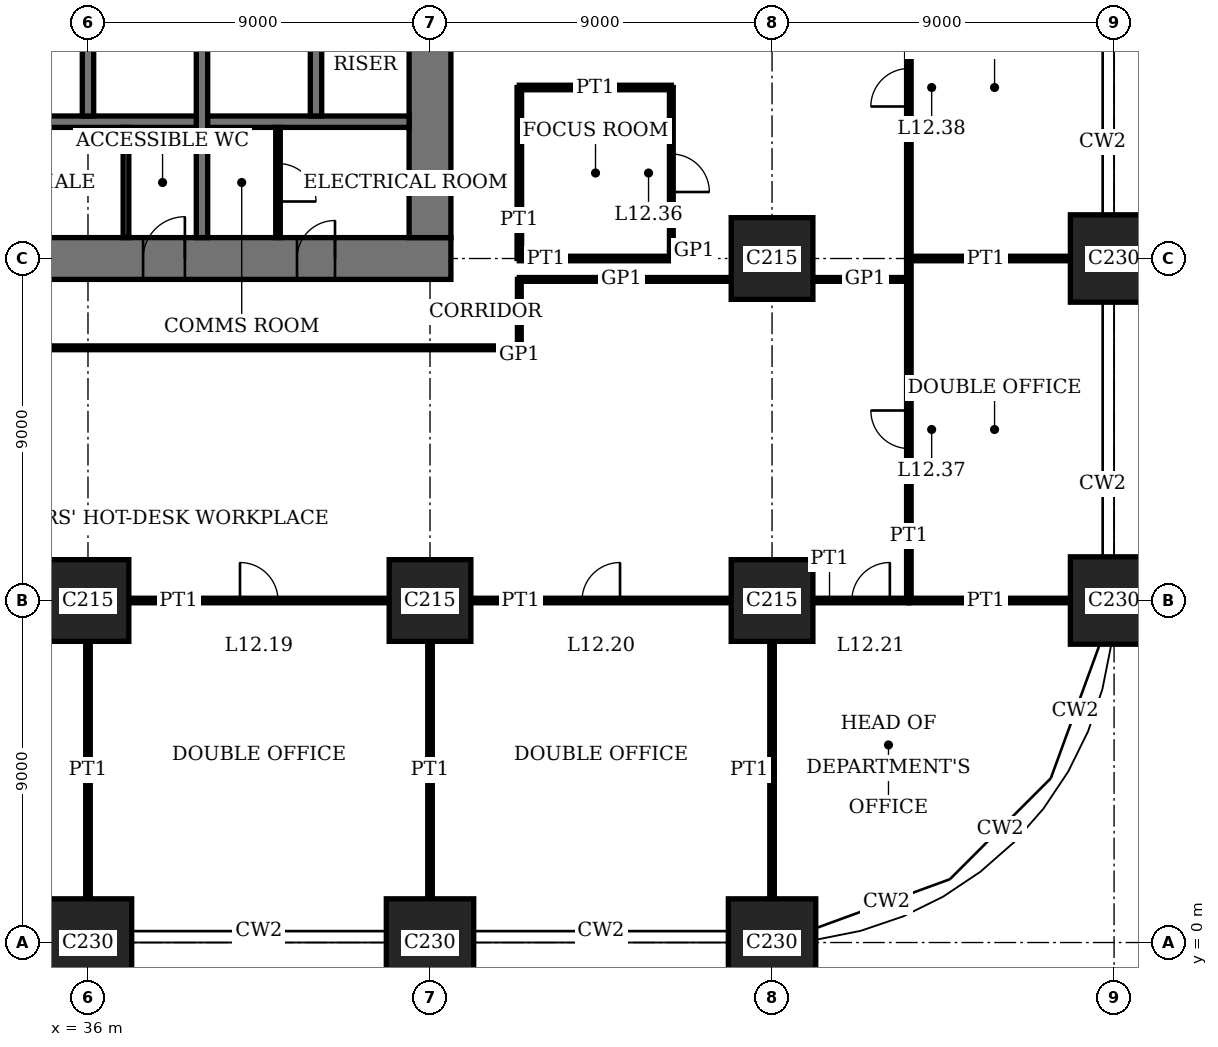
"""IFC4 building model, lengths in metres.
Left out: names, types, materials, properties, quantities, classifications, styles, units other than length and angle.
Written with IfcOpenShell. Run it as: python <this file> out.ifc"""

import sys

from ifc_helpers import new_model, si_unit, direction, frame, frame_2d, origin, origin_2d, place, context, subcontext, project, spatial, rectangle, extrude, element, fill, save


model = new_model("IFC4")
c1 = context("Model", 3, precision=1e-05, world=origin(), true_north=direction((0.0, 1.0)))
c2 = subcontext(c1, "Body", "Model", "MODEL_VIEW")
j1 = project(units=[si_unit("LENGTHUNIT", "METRE"), si_unit("PLANEANGLEUNIT", "RADIAN")], contexts=[c1])
p1 = place(None, origin())
s1 = spatial("IfcSite", under=j1, at=p1, CompositionType="ELEMENT")
p2 = place(p1, origin())
s2 = spatial("IfcBuilding", under=s1, at=p2, CompositionType="ELEMENT")
p3 = place(p2, frame((0.0, 0.0, 51.8)))
s3 = spatial("IfcBuildingStorey", under=s2, at=p3, CompositionType="ELEMENT", Elevation=51.8)
p4 = place(p3, frame((36.0, 0.0, 0.0), z_axis=(0.0, 0.0, 1.0), x_axis=(1.0, 0.0, 0.0)))
e1 = element("IfcColumn", 1, at=p4, inside=s3, PredefinedType="COLUMN", context=c2, shape_type="SweptSolid", body=[
    extrude(rectangle(XDim=2.3, YDim=2.3, at=origin_2d()), origin(), (0.0, 0.0, 1.0), 4.0),
])
p5 = place(p3, frame((36.0, 9.0, 0.0), z_axis=(0.0, 0.0, 1.0), x_axis=(1.0, 0.0, 0.0)))
e2 = element("IfcColumn", 2, at=p5, inside=s3, PredefinedType="COLUMN", context=c2, shape_type="SweptSolid", body=[
    extrude(rectangle(XDim=2.15, YDim=2.15, at=origin_2d()), origin(), (0.0, 0.0, 1.0), 4.0),
])
p6 = place(p3, frame((45.0, 0.0, 0.0), z_axis=(0.0, 0.0, 1.0), x_axis=(1.0, 0.0, 0.0)))
e3 = element("IfcColumn", 3, at=p6, inside=s3, PredefinedType="COLUMN", context=c2, shape_type="SweptSolid", body=[
    extrude(rectangle(XDim=2.3, YDim=2.3, at=origin_2d()), origin(), (0.0, 0.0, 1.0), 4.0),
])
p7 = place(p3, frame((45.0, 9.0, 0.0), z_axis=(0.0, 0.0, 1.0), x_axis=(1.0, 0.0, 0.0)))
e4 = element("IfcColumn", 4, at=p7, inside=s3, PredefinedType="COLUMN", context=c2, shape_type="SweptSolid", body=[
    extrude(rectangle(XDim=2.15, YDim=2.15, at=origin_2d()), origin(), (0.0, 0.0, 1.0), 4.0),
])
p8 = place(p3, frame((54.0, 0.0, 0.0), z_axis=(0.0, 0.0, 1.0), x_axis=(1.0, 0.0, 0.0)))
e5 = element("IfcColumn", 5, at=p8, inside=s3, PredefinedType="COLUMN", context=c2, shape_type="SweptSolid", body=[
    extrude(rectangle(XDim=2.3, YDim=2.3, at=origin_2d()), origin(), (0.0, 0.0, 1.0), 4.0),
])
for number, where, z_axis, x_axis in (
    (6, (54.0, 9.0, 0.0), (0.0, 0.0, 1.0), (1.0, 0.0, 0.0)),
    (7, (54.0, 18.0, 0.0), (0.0, 0.0, 1.0), (1.0, 0.0, 0.0)),
):
    element("IfcColumn", number, at=place(p3, frame(where, z_axis=z_axis, x_axis=x_axis)), inside=s3, PredefinedType="COLUMN", context=c2, shape_type="SweptSolid", body=[
        extrude(rectangle(XDim=2.15, YDim=2.15, at=origin_2d()), origin(), (0.0, 0.0, 1.0), 4.0),
    ])
for number, where, z_axis, x_axis in (
    (8, (63.0, 9.0, 0.0), (0.0, 0.0, 1.0), (1.0, 0.0, 0.0)),
    (9, (63.0, 18.0, 0.0), (0.0, 0.0, 1.0), (1.0, 0.0, 0.0)),
):
    element("IfcColumn", number, at=place(p3, frame(where, z_axis=z_axis, x_axis=x_axis)), inside=s3, PredefinedType="COLUMN", context=c2, shape_type="SweptSolid", body=[
        extrude(rectangle(XDim=2.3, YDim=2.3, at=origin_2d()), origin(), (0.0, 0.0, 1.0), 4.0),
    ])
p9 = place(p3, frame((17.45, 18.0, 0.0), z_axis=(0.0, 0.0, 1.0), x_axis=(1.0, 0.0, 0.0)))
e10 = element("IfcWall", 10, at=p9, inside=s3, PredefinedType="SHEAR", context=c2, shape_type="SweptSolid", body=[
    extrude(rectangle(XDim=28.1, YDim=1.1, at=frame_2d((14.05, 0.0))), origin(), (0.0, 0.0, 1.0), 4.0),
])
p10 = place(p9, frame((11.55, 0.0, 0.0)))
e11 = element("IfcOpeningElement", 11, at=p10, cuts=e10, PredefinedType="OPENING", context=c2, shape_type="SweptSolid", body=[
    extrude(rectangle(XDim=1.0, YDim=2.4, at=frame_2d((0.5, 1.2))), frame((0.0, 0.56, 0.0), z_axis=(0.0, -1.0, 0.0), x_axis=(1.0, 0.0, 0.0)), (0.0, 0.0, 1.0), 1.12),
])
p11 = place(p9, frame((16.55, 0.0, 0.0)))
e12 = element("IfcOpeningElement", 12, at=p11, cuts=e10, PredefinedType="OPENING", context=c2, shape_type="SweptSolid", body=[
    extrude(rectangle(XDim=1.0, YDim=2.4, at=frame_2d((0.5, 1.2))), frame((0.0, 0.56, 0.0), z_axis=(0.0, -1.0, 0.0), x_axis=(1.0, 0.0, 0.0)), (0.0, 0.0, 1.0), 1.12),
])
p12 = place(p9, frame((20.0, 0.0, 0.0)))
e13 = element("IfcOpeningElement", 13, at=p12, cuts=e10, PredefinedType="OPENING", context=c2, shape_type="SweptSolid", body=[
    extrude(rectangle(XDim=1.1, YDim=2.4, at=frame_2d((0.55, 1.2))), frame((0.0, 0.56, 0.0), z_axis=(0.0, -1.0, 0.0), x_axis=(1.0, 0.0, 0.0)), (0.0, 0.0, 1.0), 1.12),
])
p13 = place(p9, frame((24.05, 0.0, 0.0)))
e14 = element("IfcOpeningElement", 14, at=p13, cuts=e10, PredefinedType="OPENING", context=c2, shape_type="SweptSolid", body=[
    extrude(rectangle(XDim=1.0, YDim=2.4, at=frame_2d((0.5, 1.2))), frame((0.0, 0.56, 0.0), z_axis=(0.0, -1.0, 0.0), x_axis=(1.0, 0.0, 0.0)), (0.0, 0.0, 1.0), 1.12),
])
p14 = place(p3, frame((45.0, 18.55, 0.0), z_axis=(0.0, 0.0, 1.0), x_axis=(0.0, 1.0, 0.0)))
e15 = element("IfcWall", 15, at=p14, inside=s3, PredefinedType="SHEAR", context=c2, shape_type="SweptSolid", body=[
    extrude(rectangle(XDim=16.9, YDim=1.1, at=frame_2d((8.45, 0.0))), origin(), (0.0, 0.0, 1.0), 4.0),
])
p15 = place(p14, frame((8.45, 0.0, 0.0)))
e16 = element("IfcOpeningElement", 16, at=p15, cuts=e15, PredefinedType="OPENING", context=c2, shape_type="SweptSolid", body=[
    extrude(rectangle(XDim=1.8, YDim=2.4, at=frame_2d((0.9, 1.2))), frame((0.0, 0.56, 0.0), z_axis=(0.0, -1.0, 0.0), x_axis=(1.0, 0.0, 0.0)), (0.0, 0.0, 1.0), 1.12),
])
p16 = place(p3, frame((27.15, 21.6, 0.0), z_axis=(0.0, 0.0, 1.0), x_axis=(1.0, 0.0, 0.0)))
e17 = element("IfcWall", 17, at=p16, inside=s3, PredefinedType="SHEAR", context=c2, shape_type="SweptSolid", body=[
    extrude(rectangle(XDim=17.3, YDim=0.3, at=frame_2d((8.65, 0.0))), origin(), (0.0, 0.0, 1.0), 4.0),
])
p17 = place(p3, frame((36.0, 21.75, 0.0), z_axis=(0.0, 0.0, 1.0), x_axis=(0.0, 1.0, 0.0)))
e18 = element("IfcWall", 18, at=p17, inside=s3, PredefinedType="SHEAR", context=c2, shape_type="SweptSolid", body=[
    extrude(rectangle(XDim=2.7, YDim=0.3, at=frame_2d((1.35, 0.0))), origin(), (0.0, 0.0, 1.0), 4.0),
])
p18 = place(p3, frame((39.0, 18.55, 0.0), z_axis=(0.0, 0.0, 1.0), x_axis=(0.0, 1.0, 0.0)))
e19 = element("IfcWall", 19, at=p18, inside=s3, PredefinedType="SHEAR", context=c2, shape_type="SweptSolid", body=[
    extrude(rectangle(XDim=5.9, YDim=0.3, at=frame_2d((2.95, 0.0))), origin(), (0.0, 0.0, 1.0), 4.0),
])
p19 = place(p3, frame((42.0, 21.75, 0.0), z_axis=(0.0, 0.0, 1.0), x_axis=(0.0, 1.0, 0.0)))
e20 = element("IfcWall", 20, at=p19, inside=s3, PredefinedType="SHEAR", context=c2, shape_type="SweptSolid", body=[
    extrude(rectangle(XDim=2.7, YDim=0.3, at=frame_2d((1.35, 0.0))), origin(), (0.0, 0.0, 1.0), 4.0),
])
p20 = place(p3, frame((37.075, 9.0, 0.0), z_axis=(0.0, 0.0, 1.0), x_axis=(1.0, 0.0, 0.0)))
e21 = element("IfcWall", 21, at=p20, inside=s3, PredefinedType="PARTITIONING", context=c2, shape_type="SweptSolid", body=[
    extrude(rectangle(XDim=6.85, YDim=0.12, at=frame_2d((3.425, 0.0))), origin(), (0.0, 0.0, 1.0), 3.05),
])
p21 = place(p20, frame((2.925, 0.0, 0.0)))
e22 = element("IfcOpeningElement", 22, at=p21, cuts=e21, PredefinedType="OPENING", context=c2, shape_type="SweptSolid", body=[
    extrude(rectangle(XDim=1.0, YDim=2.4, at=frame_2d((0.5, 1.2))), frame((0.0, 0.07, 0.0), z_axis=(0.0, -1.0, 0.0), x_axis=(1.0, 0.0, 0.0)), (0.0, 0.0, 1.0), 0.14),
])
p22 = place(p3, frame((46.075, 9.0, 0.0), z_axis=(0.0, 0.0, 1.0), x_axis=(1.0, 0.0, 0.0)))
e23 = element("IfcWall", 23, at=p22, inside=s3, PredefinedType="PARTITIONING", context=c2, shape_type="SweptSolid", body=[
    extrude(rectangle(XDim=6.85, YDim=0.12, at=frame_2d((3.425, 0.0))), origin(), (0.0, 0.0, 1.0), 3.05),
])
p23 = place(p22, frame((2.925, 0.0, 0.0)))
e24 = element("IfcOpeningElement", 24, at=p23, cuts=e23, PredefinedType="OPENING", context=c2, shape_type="SweptSolid", body=[
    extrude(rectangle(XDim=1.0, YDim=2.4, at=frame_2d((0.5, 1.2))), frame((0.0, 0.07, 0.0), z_axis=(0.0, -1.0, 0.0), x_axis=(1.0, 0.0, 0.0)), (0.0, 0.0, 1.0), 0.14),
])
p24 = place(p3, frame((57.6, 9.0, 0.0), z_axis=(0.0, 0.0, 1.0), x_axis=(1.0, 0.0, 0.0)))
e25 = element("IfcWall", 25, at=p24, inside=s3, PredefinedType="PARTITIONING", context=c2, shape_type="SweptSolid", body=[
    extrude(rectangle(XDim=4.25, YDim=0.12, at=frame_2d((2.125, 0.0))), origin(), (0.0, 0.0, 1.0), 3.05),
])
p25 = place(p3, frame((55.075, 9.0, 0.0), z_axis=(0.0, 0.0, 1.0), x_axis=(1.0, 0.0, 0.0)))
e26 = element("IfcWall", 26, at=p25, inside=s3, PredefinedType="PARTITIONING", context=c2, shape_type="SweptSolid", body=[
    extrude(rectangle(XDim=2.525, YDim=0.12, at=frame_2d((1.263, 0.0))), origin(), (0.0, 0.0, 1.0), 3.05),
])
p26 = place(p25, frame((1.025, 0.0, 0.0)))
e27 = element("IfcOpeningElement", 27, at=p26, cuts=e26, PredefinedType="OPENING", context=c2, shape_type="SweptSolid", body=[
    extrude(rectangle(XDim=1.0, YDim=2.4, at=frame_2d((0.5, 1.2))), frame((0.0, 0.07, 0.0), z_axis=(0.0, -1.0, 0.0), x_axis=(1.0, 0.0, 0.0)), (0.0, 0.0, 1.0), 0.14),
])
p27 = place(p3, frame((31.5, 15.65, 0.0), z_axis=(0.0, 0.0, 1.0), x_axis=(1.0, 0.0, 0.0)))
e28 = element("IfcWall", 28, at=p27, inside=s3, PredefinedType="PARTITIONING", context=c2, shape_type="SweptSolid", body=[
    extrude(rectangle(XDim=15.85, YDim=0.1, at=frame_2d((7.925, 0.0))), origin(), (0.0, 0.0, 1.0), 3.75),
])
p28 = place(p3, frame((47.35, 17.45, 0.0), z_axis=(0.0, 0.0, 1.0), x_axis=(1.0, 0.0, 0.0)))
e29 = element("IfcWall", 29, at=p28, inside=s3, PredefinedType="PARTITIONING", context=c2, shape_type="SweptSolid", body=[
    extrude(rectangle(XDim=5.575, YDim=0.1, at=frame_2d((2.788, 0.0))), origin(), (0.0, 0.0, 1.0), 3.75),
])
p29 = place(p3, frame((55.075, 17.45, 0.0), z_axis=(0.0, 0.0, 1.0), x_axis=(1.0, 0.0, 0.0)))
e30 = element("IfcWall", 30, at=p29, inside=s3, PredefinedType="PARTITIONING", context=c2, shape_type="SweptSolid", body=[
    extrude(rectangle(XDim=2.535, YDim=0.1, at=frame_2d((1.268, 0.0))), origin(), (0.0, 0.0, 1.0), 3.75),
])
p30 = place(p3, frame((57.6, 18.0, 0.0), z_axis=(0.0, 0.0, 1.0), x_axis=(1.0, 0.0, 0.0)))
e31 = element("IfcWall", 31, at=p30, inside=s3, PredefinedType="PARTITIONING", context=c2, shape_type="SweptSolid", body=[
    extrude(rectangle(XDim=4.25, YDim=0.12, at=frame_2d((2.125, 0.0))), origin(), (0.0, 0.0, 1.0), 3.05),
])
p31 = place(p3, frame((47.35, 18.0, 0.0), z_axis=(0.0, 0.0, 1.0), x_axis=(1.0, 0.0, 0.0)))
e32 = element("IfcWall", 32, at=p31, inside=s3, PredefinedType="PARTITIONING", context=c2, shape_type="SweptSolid", body=[
    extrude(rectangle(XDim=4.0, YDim=0.12, at=frame_2d((2.0, 0.0))), origin(), (0.0, 0.0, 1.0), 3.05),
])
p32 = place(p3, frame((47.35, 22.5, 0.0), z_axis=(0.0, 0.0, 1.0), x_axis=(1.0, 0.0, 0.0)))
e33 = element("IfcWall", 33, at=p32, inside=s3, PredefinedType="PARTITIONING", context=c2, shape_type="SweptSolid", body=[
    extrude(rectangle(XDim=4.0, YDim=0.12, at=frame_2d((2.0, 0.0))), origin(), (0.0, 0.0, 1.0), 3.1),
])
for number, where, z_axis, x_axis in (
    (34, (36.0, 1.15, 0.0), (0.0, 0.0, 1.0), (0.0, 1.0, 0.0)),
    (35, (45.0, 1.15, 0.0), (0.0, 0.0, 1.0), (0.0, 1.0, 0.0)),
):
    element("IfcWall", number, at=place(p3, frame(where, z_axis=z_axis, x_axis=x_axis)), inside=s3, PredefinedType="PARTITIONING", context=c2, shape_type="SweptSolid", body=[
        extrude(rectangle(XDim=6.775, YDim=0.12, at=frame_2d((3.388, 0.0))), origin(), (0.0, 0.0, 1.0), 3.05),
    ])
p33 = place(p3, frame((47.35, 18.0, 0.0), z_axis=(0.0, 0.0, 1.0), x_axis=(0.0, 1.0, 0.0)))
e36 = element("IfcWall", 36, at=p33, inside=s3, PredefinedType="PARTITIONING", context=c2, shape_type="SweptSolid", body=[
    extrude(rectangle(XDim=4.5, YDim=0.12, at=frame_2d((2.25, 0.0))), origin(), (0.0, 0.0, 1.0), 3.75),
])
p34 = place(p3, frame((47.35, 15.65, 0.0), z_axis=(0.0, 0.0, 1.0), x_axis=(0.0, 1.0, 0.0)))
e37 = element("IfcWall", 37, at=p34, inside=s3, PredefinedType="PARTITIONING", context=c2, shape_type="SweptSolid", body=[
    extrude(rectangle(XDim=1.8, YDim=0.1, at=frame_2d((0.9, 0.0))), origin(), (0.0, 0.0, 1.0), 3.75),
])
p35 = place(p3, frame((51.35, 18.0, 0.0), z_axis=(0.0, 0.0, 1.0), x_axis=(0.0, 1.0, 0.0)))
e38 = element("IfcWall", 38, at=p35, inside=s3, PredefinedType="PARTITIONING", context=c2, shape_type="SweptSolid", body=[
    extrude(rectangle(XDim=4.5, YDim=0.1, at=frame_2d((2.25, 0.0))), origin(), (0.0, 0.0, 1.0), 3.75),
])
p36 = place(p35, frame((1.75, 0.0, 0.0)))
e39 = element("IfcOpeningElement", 39, at=p36, cuts=e38, PredefinedType="OPENING", context=c2, shape_type="SweptSolid", body=[
    extrude(rectangle(XDim=1.0, YDim=2.4, at=frame_2d((0.5, 1.2))), frame((0.0, 0.06, 0.0), z_axis=(0.0, -1.0, 0.0), x_axis=(1.0, 0.0, 0.0)), (0.0, 0.0, 1.0), 0.12),
])
p37 = place(p3, frame((54.0, 1.15, 0.0), z_axis=(0.0, 0.0, 1.0), x_axis=(0.0, 1.0, 0.0)))
e40 = element("IfcWall", 40, at=p37, inside=s3, PredefinedType="PARTITIONING", context=c2, shape_type="SweptSolid", body=[
    extrude(rectangle(XDim=6.775, YDim=0.12, at=frame_2d((3.388, 0.0))), origin(), (0.0, 0.0, 1.0), 3.05),
])
p38 = place(p3, frame((57.6, 9.0, 0.0), z_axis=(0.0, 0.0, 1.0), x_axis=(0.0, 1.0, 0.0)))
e41 = element("IfcWall", 41, at=p38, inside=s3, PredefinedType="PARTITIONING", context=c2, shape_type="SweptSolid", body=[
    extrude(rectangle(XDim=9.0, YDim=0.12, at=frame_2d((4.5, 0.0))), origin(), (0.0, 0.0, 1.0), 3.75),
])
p39 = place(p38, frame((4.0, 0.0, 0.0)))
e42 = element("IfcOpeningElement", 42, at=p39, cuts=e41, PredefinedType="OPENING", context=c2, shape_type="SweptSolid", body=[
    extrude(rectangle(XDim=1.0, YDim=2.4, at=frame_2d((0.5, 1.2))), frame((0.0, 0.07, 0.0), z_axis=(0.0, -1.0, 0.0), x_axis=(1.0, 0.0, 0.0)), (0.0, 0.0, 1.0), 0.14),
])
p40 = place(p3, frame((57.6, 18.0, 0.0), z_axis=(0.0, 0.0, 1.0), x_axis=(0.0, 1.0, 0.0)))
e43 = element("IfcWall", 43, at=p40, inside=s3, PredefinedType="PARTITIONING", context=c2, shape_type="SweptSolid", body=[
    extrude(rectangle(XDim=9.0, YDim=0.12, at=frame_2d((4.5, 0.0))), origin(), (0.0, 0.0, 1.0), 3.75),
])
p41 = place(p40, frame((4.0, 0.0, 0.0)))
e44 = element("IfcOpeningElement", 44, at=p41, cuts=e43, PredefinedType="OPENING", context=c2, shape_type="SweptSolid", body=[
    extrude(rectangle(XDim=1.0, YDim=2.4, at=frame_2d((0.5, 1.2))), frame((0.0, 0.07, 0.0), z_axis=(0.0, -1.0, 0.0), x_axis=(1.0, 0.0, 0.0)), (0.0, 0.0, 1.0), 0.14),
])
p42 = place(p3, frame((37.0, 18.55, 0.0), z_axis=(0.0, 0.0, 1.0), x_axis=(0.0, 1.0, 0.0)))
e45 = element("IfcWall", 45, at=p42, inside=s3, PredefinedType="PARTITIONING", context=c2, shape_type="SweptSolid", body=[
    extrude(rectangle(XDim=2.9, YDim=0.15, at=frame_2d((1.45, 0.0))), origin(), (0.0, 0.0, 1.0), 3.75),
])
p43 = place(p3, frame((41.0, 18.55, 0.0), z_axis=(0.0, 0.0, 1.0), x_axis=(0.0, 1.0, 0.0)))
e46 = element("IfcWall", 46, at=p43, inside=s3, PredefinedType="PARTITIONING", context=c2, shape_type="SweptSolid", body=[
    extrude(rectangle(XDim=2.9, YDim=0.12, at=frame_2d((1.45, 0.0))), origin(), (0.0, 0.0, 1.0), 3.75),
])
p44 = place(p43, frame((0.95, 0.0, 0.0)))
e47 = element("IfcOpeningElement", 47, at=p44, cuts=e46, PredefinedType="OPENING", context=c2, shape_type="SweptSolid", body=[
    extrude(rectangle(XDim=1.0, YDim=2.4, at=frame_2d((0.5, 1.2))), frame((0.0, 0.07, 0.0), z_axis=(0.0, -1.0, 0.0), x_axis=(1.0, 0.0, 0.0)), (0.0, 0.0, 1.0), 0.14),
])
p45 = place(p12, origin())
e48 = element("IfcDoor", 48, at=p45, inside=s3, OperationType="SINGLE_SWING_LEFT", PredefinedType="DOOR", context=c2, shape_type="SweptSolid", body=[
    extrude(rectangle(XDim=1.1, YDim=2.4, at=frame_2d((0.55, 1.2))), frame((0.0, 0.025, 0.0), z_axis=(0.0, -1.0, 0.0), x_axis=(1.0, 0.0, 0.0)), (0.0, 0.0, 1.0), 0.05),
    extrude(rectangle(XDim=0.04, YDim=2.4, at=frame_2d((0.02, 1.2))), frame((0.0, 0.44, 0.0), z_axis=(0.0, -1.0, 0.0), x_axis=(1.0, 0.0, 0.0)), (0.0, 0.0, 1.0), 0.88),
    extrude(rectangle(XDim=0.04, YDim=2.4, at=frame_2d((1.08, 1.2))), frame((0.0, 0.44, 0.0), z_axis=(0.0, -1.0, 0.0), x_axis=(1.0, 0.0, 0.0)), (0.0, 0.0, 1.0), 0.88),
    extrude(rectangle(XDim=1.1, YDim=0.04, at=frame_2d((0.55, 2.38))), frame((0.0, 0.44, 0.0), z_axis=(0.0, -1.0, 0.0), x_axis=(1.0, 0.0, 0.0)), (0.0, 0.0, 1.0), 0.88),
])
fill(e13, e48)
p46 = place(p13, origin())
e49 = element("IfcDoor", 49, at=p46, inside=s3, OperationType="SINGLE_SWING_LEFT", PredefinedType="DOOR", context=c2, shape_type="SweptSolid", body=[
    extrude(rectangle(XDim=1.0, YDim=2.4, at=frame_2d((0.5, 1.2))), frame((0.0, 0.025, 0.0), z_axis=(0.0, -1.0, 0.0), x_axis=(1.0, 0.0, 0.0)), (0.0, 0.0, 1.0), 0.05),
    extrude(rectangle(XDim=0.04, YDim=2.4, at=frame_2d((0.02, 1.2))), frame((0.0, 0.4, 0.0), z_axis=(0.0, -1.0, 0.0), x_axis=(1.0, 0.0, 0.0)), (0.0, 0.0, 1.0), 0.8),
    extrude(rectangle(XDim=0.04, YDim=2.4, at=frame_2d((0.98, 1.2))), frame((0.0, 0.4, 0.0), z_axis=(0.0, -1.0, 0.0), x_axis=(1.0, 0.0, 0.0)), (0.0, 0.0, 1.0), 0.8),
    extrude(rectangle(XDim=1.0, YDim=0.04, at=frame_2d((0.5, 2.38))), frame((0.0, 0.4, 0.0), z_axis=(0.0, -1.0, 0.0), x_axis=(1.0, 0.0, 0.0)), (0.0, 0.0, 1.0), 0.8),
])
fill(e14, e49)
p47 = place(p21, origin())
e50 = element("IfcDoor", 50, at=p47, inside=s3, OperationType="SINGLE_SWING_RIGHT", PredefinedType="DOOR", context=c2, shape_type="SweptSolid", body=[
    extrude(rectangle(XDim=1.0, YDim=2.4, at=frame_2d((0.5, 1.2))), frame((0.0, 0.025, 0.0), z_axis=(0.0, -1.0, 0.0), x_axis=(1.0, 0.0, 0.0)), (0.0, 0.0, 1.0), 0.05),
])
fill(e22, e50)
p48 = place(p23, origin())
e51 = element("IfcDoor", 51, at=p48, inside=s3, OperationType="SINGLE_SWING_LEFT", PredefinedType="DOOR", context=c2, shape_type="SweptSolid", body=[
    extrude(rectangle(XDim=1.0, YDim=2.4, at=frame_2d((0.5, 1.2))), frame((0.0, 0.025, 0.0), z_axis=(0.0, -1.0, 0.0), x_axis=(1.0, 0.0, 0.0)), (0.0, 0.0, 1.0), 0.05),
])
fill(e24, e51)
p49 = place(p26, origin())
e52 = element("IfcDoor", 52, at=p49, inside=s3, OperationType="SINGLE_SWING_LEFT", PredefinedType="DOOR", context=c2, shape_type="SweptSolid", body=[
    extrude(rectangle(XDim=1.0, YDim=2.4, at=frame_2d((0.5, 1.2))), frame((0.0, 0.025, 0.0), z_axis=(0.0, -1.0, 0.0), x_axis=(1.0, 0.0, 0.0)), (0.0, 0.0, 1.0), 0.05),
])
fill(e27, e52)
p50 = place(p36, origin())
e53 = element("IfcDoor", 53, at=p50, inside=s3, OperationType="SINGLE_SWING_LEFT", PredefinedType="DOOR", context=c2, shape_type="SweptSolid", body=[
    extrude(rectangle(XDim=1.0, YDim=2.4, at=frame_2d((0.5, 1.2))), frame((0.0, 0.02, 0.0), z_axis=(0.0, -1.0, 0.0), x_axis=(1.0, 0.0, 0.0)), (0.0, 0.0, 1.0), 0.04),
])
fill(e39, e53)
p51 = place(p39, origin())
e54 = element("IfcDoor", 54, at=p51, inside=s3, OperationType="SINGLE_SWING_LEFT", PredefinedType="DOOR", context=c2, shape_type="SweptSolid", body=[
    extrude(rectangle(XDim=1.0, YDim=2.4, at=frame_2d((0.5, 1.2))), frame((0.0, 0.025, 0.0), z_axis=(0.0, -1.0, 0.0), x_axis=(1.0, 0.0, 0.0)), (0.0, 0.0, 1.0), 0.05),
])
fill(e42, e54)
p52 = place(p41, origin())
e55 = element("IfcDoor", 55, at=p52, inside=s3, OperationType="SINGLE_SWING_RIGHT", PredefinedType="DOOR", context=c2, shape_type="SweptSolid", body=[
    extrude(rectangle(XDim=1.0, YDim=2.4, at=frame_2d((0.5, 1.2))), frame((0.0, 0.025, 0.0), z_axis=(0.0, -1.0, 0.0), x_axis=(1.0, 0.0, 0.0)), (0.0, 0.0, 1.0), 0.05),
])
fill(e44, e55)
p53 = place(p44, origin())
e56 = element("IfcDoor", 56, at=p53, inside=s3, OperationType="SINGLE_SWING_LEFT", PredefinedType="DOOR", context=c2, shape_type="SweptSolid", body=[
    extrude(rectangle(XDim=1.0, YDim=2.4, at=frame_2d((0.5, 1.2))), frame((0.0, 0.03, 0.0), z_axis=(0.0, -1.0, 0.0), x_axis=(1.0, 0.0, 0.0)), (0.0, 0.0, 1.0), 0.06),
])
fill(e47, e56)
save(model, sys.argv[1])
